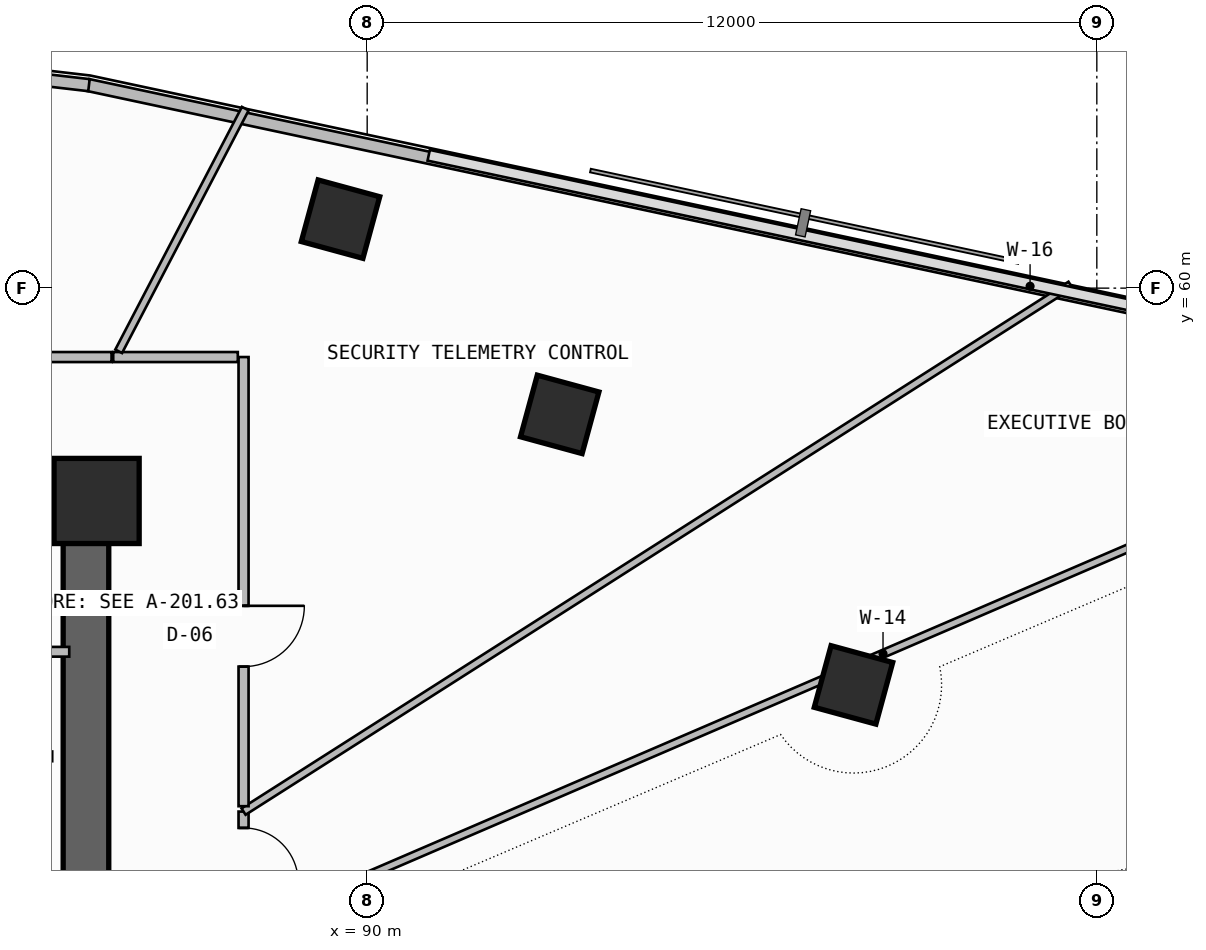
"""IFC4 building model, lengths in metres.
Left out: names, types, materials, properties, quantities, classifications, styles, units other than length and angle.
Written with IfcOpenShell. Run it as: python <this file> out.ifc"""

import sys

from ifc_helpers import new_model, si_unit, direction, frame, frame_2d, origin, origin_2d, place, context, subcontext, project, spatial, rectangle, extrude, element, fill, save


model = new_model("IFC4")
c1 = context("Model", 3, precision=1e-05, world=origin(), true_north=direction((0.0, 1.0)))
c2 = subcontext(c1, "Body", "Model", "MODEL_VIEW")
j1 = project(units=[si_unit("LENGTHUNIT", "METRE"), si_unit("PLANEANGLEUNIT", "RADIAN")], contexts=[c1])
p1 = place(None, origin())
s1 = spatial("IfcSite", under=j1, at=p1, CompositionType="ELEMENT")
p2 = place(p1, origin())
s2 = spatial("IfcBuilding", under=s1, at=p2, CompositionType="ELEMENT")
p3 = place(p2, frame((0.0, 0.0, 225.54)))
s3 = spatial("IfcBuildingStorey", under=s2, at=p3, CompositionType="ELEMENT", Elevation=225.54)
p4 = place(p3, frame((72.0, 56.425, -0.26), z_axis=(0.0, 0.0, 1.0), x_axis=(1.0, 0.0, 0.0)))
e1 = element("IfcWall", 1, at=p4, inside=s3, PredefinedType="SHEAR", context=c2, shape_type="SweptSolid", body=[
    extrude(rectangle(XDim=13.75, YDim=0.75, at=frame_2d((6.875, 0.0))), origin(), (0.0, 0.0, 1.0), 3.52),
])
p5 = place(p3, frame((85.375, 47.6, -0.26), z_axis=(0.0, 0.0, 1.0), x_axis=(0.0, 1.0, 0.0)))
e2 = element("IfcWall", 2, at=p5, inside=s3, PredefinedType="SHEAR", context=c2, shape_type="SweptSolid", body=[
    extrude(rectangle(XDim=8.45, YDim=0.75, at=frame_2d((4.225, 0.0))), origin(), (0.0, 0.0, 1.0), 3.52),
])
p6 = place(p3, frame((85.55, 56.5, 0.0), z_axis=(0.0, 0.0, 1.0), x_axis=(1.0, 0.0, 0.0)))
e3 = element("IfcColumn", 3, at=p6, inside=s3, PredefinedType="COLUMN", context=c2, shape_type="SweptSolid", body=[
    extrude(rectangle(XDim=1.4, YDim=1.4, at=origin_2d()), origin(), (0.0, 0.0, 1.0), 3.52),
])
for number, where, z_axis, x_axis in (
    (4, (97.998, 53.475, 0.0), (0.0, 0.0, 1.0), (0.263, 0.965, 0.0)),
    (5, (93.167, 57.924, 0.0), (0.0, 0.0, 1.0), (0.263, 0.965, 0.0)),
    (6, (89.562, 61.135, 0.0), (0.0, 0.0, 1.0), (0.263, 0.965, 0.0)),
):
    element("IfcColumn", number, at=place(p3, frame(where, z_axis=z_axis, x_axis=x_axis)), inside=s3, PredefinedType="COLUMN", context=c2, shape_type="SweptSolid", body=[
        extrude(rectangle(XDim=1.05, YDim=1.05, at=origin_2d()), origin(), (0.0, 0.0, 1.0), 3.52),
    ])
p7 = place(p3, frame((116.396, 56.722, 0.0), z_axis=(0.0, 0.0, 1.0), x_axis=(-0.977936620644, 0.208901809478, 0.0)))
e7 = element("IfcWall", 7, at=p7, inside=s3, PredefinedType="PARAPET", context=c2, shape_type="SweptSolid", body=[
    extrude(rectangle(XDim=31.685, YDim=0.2, at=frame_2d((15.843, 0.0))), origin(), (0.0, 0.0, 1.0), 1.15),
])
p8 = place(p3, frame((85.424, 63.338, 0.0), z_axis=(0.0, 0.0, 1.0), x_axis=(-0.993364714048, 0.115006716693, 0.0)))
e8 = element("IfcWall", 8, at=p8, inside=s3, PredefinedType="PARAPET", context=c2, shape_type="SweptSolid", body=[
    extrude(rectangle(XDim=26.302, YDim=0.2, at=frame_2d((13.151, 0.0))), origin(), (0.0, 0.0, 1.0), 1.15),
])
p9 = place(p3, frame((73.02, 54.02, 0.0), z_axis=(0.0, 0.0, 1.0), x_axis=(1.0, 0.0, 0.0)))
e9 = element("IfcWall", 9, at=p9, inside=s3, PredefinedType="SOLIDWALL", context=c2, shape_type="SweptSolid", body=[
    extrude(rectangle(XDim=12.08, YDim=0.16, at=frame_2d((6.04, 0.0))), origin(), (0.0, 0.0, 1.0), 3.26),
])
p10 = place(p9, frame((4.03, 0.0, 0.0)))
e10 = element("IfcOpeningElement", 10, at=p10, cuts=e9, PredefinedType="OPENING", context=c2, shape_type="SweptSolid", body=[
    extrude(rectangle(XDim=1.1, YDim=2.25, at=frame_2d((0.55, 1.125))), frame((0.0, 0.09, 0.0), z_axis=(0.0, -1.0, 0.0), x_axis=(1.0, 0.0, 0.0)), (0.0, 0.0, 1.0), 0.18),
])
p11 = place(p9, frame((6.28, 0.0, 0.0)))
e11 = element("IfcOpeningElement", 11, at=p11, cuts=e9, PredefinedType="OPENING", context=c2, shape_type="SweptSolid", body=[
    extrude(rectangle(XDim=1.1, YDim=2.25, at=frame_2d((0.55, 1.125))), frame((0.0, 0.09, 0.0), z_axis=(0.0, -1.0, 0.0), x_axis=(1.0, 0.0, 0.0)), (0.0, 0.0, 1.0), 0.18),
])
p12 = place(p9, frame((8.53, 0.0, 0.0)))
e12 = element("IfcOpeningElement", 12, at=p12, cuts=e9, PredefinedType="OPENING", context=c2, shape_type="SweptSolid", body=[
    extrude(rectangle(XDim=1.1, YDim=2.25, at=frame_2d((0.55, 1.125))), frame((0.0, 0.09, 0.0), z_axis=(0.0, -1.0, 0.0), x_axis=(1.0, 0.0, 0.0)), (0.0, 0.0, 1.0), 0.18),
])
p13 = place(p3, frame((88.045, 49.493, 0.0), z_axis=(0.0, 0.0, 1.0), x_axis=(0.918480929911, 0.395465272041, 0.0)))
e13 = element("IfcWall", 13, at=p13, inside=s3, PredefinedType="PARTITIONING", context=c2, shape_type="SweptSolid", body=[
    extrude(rectangle(XDim=22.729, YDim=0.125, at=frame_2d((11.365, 0.0))), origin(), (0.0, 0.0, 1.0), 2.645),
])
p14 = place(p3, frame((87.967, 49.519, 0.0), z_axis=(0.0, 0.0, 1.0), x_axis=(0.0, 1.0, 0.0)))
e14 = element("IfcWall", 14, at=p14, inside=s3, PredefinedType="PARTITIONING", context=c2, shape_type="SweptSolid", body=[
    extrude(rectangle(XDim=1.873, YDim=0.165, at=frame_2d((0.937, 0.0))), origin(), (0.0, 0.0, 1.0), 3.26),
])
p15 = place(p14, frame((0.704, 0.0, 0.0)))
e15 = element("IfcOpeningElement", 15, at=p15, cuts=e14, PredefinedType="OPENING", context=c2, shape_type="SweptSolid", body=[
    extrude(rectangle(XDim=0.9, YDim=2.1, at=frame_2d((0.45, 1.05))), frame((0.0, 0.093, 0.0), z_axis=(0.0, -1.0, 0.0), x_axis=(1.0, 0.0, 0.0)), (0.0, 0.0, 1.0), 0.185),
])
p16 = place(p3, frame((87.967, 51.392, 0.0), z_axis=(0.0, 0.0, 1.0), x_axis=(0.843496225595, 0.537135101634, 0.0)))
e16 = element("IfcWall", 16, at=p16, inside=s3, PredefinedType="PARTITIONING", context=c2, shape_type="SweptSolid", body=[
    extrude(rectangle(XDim=16.124, YDim=0.125, at=frame_2d((8.062, 0.0))), origin(), (0.0, 0.0, 1.0), 2.645),
])
p17 = place(p3, frame((87.967, 51.48, 0.0), z_axis=(0.0, 0.0, 1.0), x_axis=(0.0, 1.0, 0.0)))
e17 = element("IfcWall", 17, at=p17, inside=s3, PredefinedType="PARTITIONING", context=c2, shape_type="SweptSolid", body=[
    extrude(rectangle(XDim=7.386, YDim=0.165, at=frame_2d((3.693, 0.0))), origin(), (0.0, 0.0, 1.0), 2.745),
])
p18 = place(p17, frame((2.295, 0.0, 0.0)))
e18 = element("IfcOpeningElement", 18, at=p18, cuts=e17, PredefinedType="OPENING", context=c2, shape_type="SweptSolid", body=[
    extrude(rectangle(XDim=1.0, YDim=2.2, at=frame_2d((0.5, 1.1))), frame((0.0, 0.093, 0.0), z_axis=(0.0, -1.0, 0.0), x_axis=(1.0, 0.0, 0.0)), (0.0, 0.0, 1.0), 0.185),
])
p19 = place(p3, frame((87.872, 58.867, 0.0), z_axis=(0.0, 0.0, 1.0), x_axis=(-1.0, 0.0, 0.0)))
e19 = element("IfcWall", 19, at=p19, inside=s3, PredefinedType="PARTITIONING", context=c2, shape_type="SweptSolid", body=[
    extrude(rectangle(XDim=2.049, YDim=0.165, at=frame_2d((1.024, 0.0))), origin(), (0.0, 0.0, 1.0), 2.745),
])
p20 = place(p3, frame((85.913, 58.961, 0.0), z_axis=(0.0, 0.0, 1.0), x_axis=(0.462551177511, 0.886592582973, 0.0)))
e20 = element("IfcWall", 20, at=p20, inside=s3, PredefinedType="PARTITIONING", context=c2, shape_type="SweptSolid", body=[
    extrude(rectangle(XDim=4.501, YDim=0.125, at=frame_2d((2.25, 0.0))), origin(), (0.0, 0.0, 1.0), 3.26),
])
p21 = place(p3, frame((85.796, 58.867, 0.0), z_axis=(0.0, 0.0, 1.0), x_axis=(-1.0, 0.0, 0.0)))
e21 = element("IfcWall", 21, at=p21, inside=s3, PredefinedType="PARTITIONING", context=c2, shape_type="SweptSolid", body=[
    extrude(rectangle(XDim=6.146, YDim=0.165, at=frame_2d((3.073, 0.0))), origin(), (0.0, 0.0, 1.0), 3.26),
])
p22 = place(p21, frame((2.573, 0.0, 0.0)))
e22 = element("IfcOpeningElement", 22, at=p22, cuts=e21, PredefinedType="OPENING", context=c2, shape_type="SweptSolid", body=[
    extrude(rectangle(XDim=1.0, YDim=2.2, at=frame_2d((0.5, 1.1))), frame((0.0, 0.093, 0.0), z_axis=(0.0, -1.0, 0.0), x_axis=(1.0, 0.0, 0.0)), (0.0, 0.0, 1.0), 0.185),
])
p23 = place(p15, frame((0.9, 0.0, 0.0), z_axis=(0.0, 0.0, 1.0), x_axis=(-1.0, 0.0, 0.0)))
e23 = element("IfcDoor", 23, at=p23, inside=s3, OperationType="SINGLE_SWING_RIGHT", PredefinedType="DOOR", context=c2, shape_type="SweptSolid", body=[
    extrude(rectangle(XDim=0.9, YDim=2.1, at=frame_2d((0.45, 1.05))), frame((0.0, 0.025, 0.0), z_axis=(0.0, -1.0, 0.0), x_axis=(1.0, 0.0, 0.0)), (0.0, 0.0, 1.0), 0.05),
])
fill(e15, e23)
p24 = place(p18, frame((1.0, 0.0, 0.0), z_axis=(0.0, 0.0, 1.0), x_axis=(-1.0, 0.0, 0.0)))
e24 = element("IfcDoor", 24, at=p24, inside=s3, OperationType="SINGLE_SWING_LEFT", PredefinedType="DOOR", context=c2, shape_type="SweptSolid", body=[
    extrude(rectangle(XDim=1.0, YDim=2.2, at=frame_2d((0.5, 1.1))), frame((0.0, 0.025, 0.0), z_axis=(0.0, -1.0, 0.0), x_axis=(1.0, 0.0, 0.0)), (0.0, 0.0, 1.0), 0.05),
])
fill(e18, e24)
save(model, sys.argv[1])
